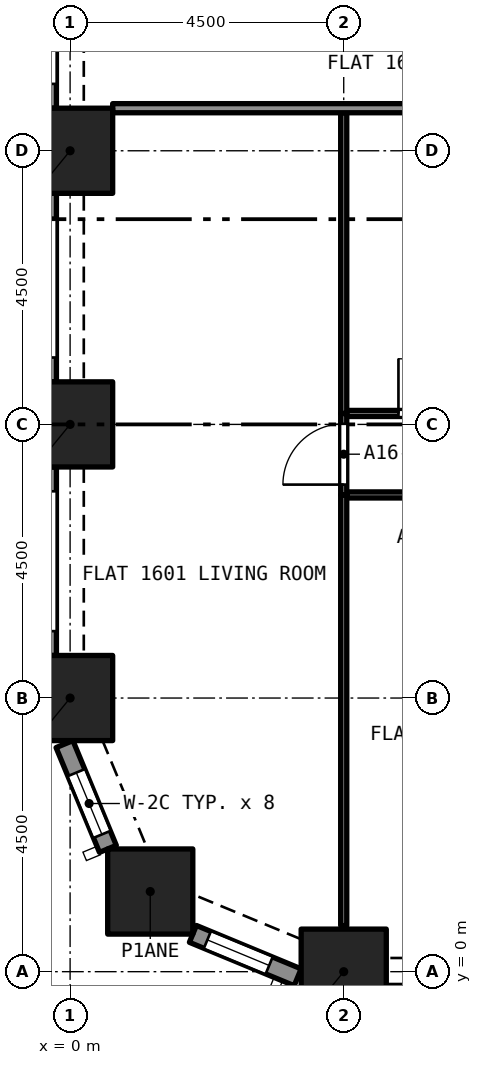
"""IFC4 building model, lengths in metres.
Left out: names, types, materials, properties, quantities, classifications, styles, units other than length and angle.
Written with IfcOpenShell. Run it as: python <this file> out.ifc"""

import sys

from ifc_helpers import new_model, si_unit, direction, frame, frame_2d, origin, origin_2d, place, context, subcontext, project, spatial, rectangle, extrude, element, fill, save


model = new_model("IFC4")
c1 = context("Model", 3, precision=1e-05, world=origin(), true_north=direction((0.0, 1.0)))
c2 = subcontext(c1, "Body", "Model", "MODEL_VIEW")
j1 = project(units=[si_unit("LENGTHUNIT", "METRE"), si_unit("PLANEANGLEUNIT", "RADIAN")], contexts=[c1])
p1 = place(None, origin())
s1 = spatial("IfcSite", under=j1, at=p1, CompositionType="ELEMENT")
p2 = place(p1, origin())
s2 = spatial("IfcBuilding", under=s1, at=p2, CompositionType="ELEMENT")
p3 = place(p2, frame((0.0, 0.0, 62.4)))
s3 = spatial("IfcBuildingStorey", under=s2, at=p3, CompositionType="ELEMENT", Elevation=62.4)
for number, where, z_axis, x_axis in (
    (1, (4.5, 0.0, 0.0), (0.0, 0.0, 1.0), (1.0, 0.0, 0.0)),
    (2, (1.318, 1.318, 0.0), (0.0, 0.0, 1.0), (1.0, 0.0, 0.0)),
    (3, (0.0, 4.5, 0.0), (0.0, 0.0, 1.0), (1.0, 0.0, 0.0)),
    (4, (0.0, 9.0, 0.0), (0.0, 0.0, 1.0), (1.0, 0.0, 0.0)),
    (5, (0.0, 13.5, 0.0), (0.0, 0.0, 1.0), (1.0, 0.0, 0.0)),
):
    element("IfcColumn", number, at=place(p3, frame(where, z_axis=z_axis, x_axis=x_axis)), inside=s3, PredefinedType="COLUMN", context=c2, shape_type="SweptSolid", body=[
        extrude(rectangle(XDim=1.4, YDim=1.4, at=origin_2d()), origin(), (0.0, 0.0, 1.0), 3.2),
    ])
p4 = place(p3, frame((0.622, 2.02, 0.0), z_axis=(0.0, 0.0, 1.0), x_axis=(-0.38262540684, 0.923903565336, 0.0)))
e6 = element("IfcWall", 6, at=p4, inside=s3, PredefinedType="SOLIDWALL", context=c2, shape_type="SweptSolid", body=[
    extrude(rectangle(XDim=1.865, YDim=0.3, at=frame_2d((0.933, 0.0))), origin(), (0.0, 0.0, 1.0), 3.2),
])
p5 = place(p4, frame((0.258, 0.0, 0.45)))
e7 = element("IfcOpeningElement", 7, at=p5, cuts=e6, PredefinedType="OPENING", context=c2, shape_type="SweptSolid", body=[
    extrude(rectangle(XDim=1.1, YDim=1.95, at=frame_2d((0.55, 0.975))), frame((0.0, 0.16, 0.0), z_axis=(0.0, -1.0, 0.0), x_axis=(1.0, 0.0, 0.0)), (0.0, 0.0, 1.0), 0.32),
])
p6 = place(p3, frame((3.743, -0.092, 0.0), z_axis=(0.0, 0.0, 1.0), x_axis=(-0.923857286003, 0.382737135771, 0.0)))
e8 = element("IfcWall", 8, at=p6, inside=s3, PredefinedType="SOLIDWALL", context=c2, shape_type="SweptSolid", body=[
    extrude(rectangle(XDim=1.865, YDim=0.3, at=frame_2d((0.933, 0.0))), origin(), (0.0, 0.0, 1.0), 3.2),
])
p7 = place(p6, frame((0.508, 0.0, 0.45)))
e9 = element("IfcOpeningElement", 9, at=p7, cuts=e8, PredefinedType="OPENING", context=c2, shape_type="SweptSolid", body=[
    extrude(rectangle(XDim=1.1, YDim=1.95, at=frame_2d((0.55, 0.975))), frame((0.0, 0.16, 0.0), z_axis=(0.0, -1.0, 0.0), x_axis=(1.0, 0.0, 0.0)), (0.0, 0.0, 1.0), 0.32),
])
p8 = place(p3, frame((-0.375, 14.2, 0.0), z_axis=(0.0, 0.0, 1.0), x_axis=(0.0, 1.0, 0.0)))
e10 = element("IfcWall", 10, at=p8, inside=s3, PredefinedType="SOLIDWALL", context=c2, shape_type="SweptSolid", body=[
    extrude(rectangle(XDim=3.1, YDim=0.3, at=frame_2d((1.55, 0.0))), origin(), (0.0, 0.0, 1.0), 3.2),
])
p9 = place(p8, frame((0.4, 0.0, 0.45)))
e11 = element("IfcOpeningElement", 11, at=p9, cuts=e10, PredefinedType="OPENING", context=c2, shape_type="SweptSolid", body=[
    extrude(rectangle(XDim=2.3, YDim=1.95, at=frame_2d((1.15, 0.975))), frame((0.0, 0.16, 0.0), z_axis=(0.0, -1.0, 0.0), x_axis=(1.0, 0.0, 0.0)), (0.0, 0.0, 1.0), 0.32),
])
p10 = place(p3, frame((-0.375, 9.7, 0.0), z_axis=(0.0, 0.0, 1.0), x_axis=(0.0, 1.0, 0.0)))
e12 = element("IfcWall", 12, at=p10, inside=s3, PredefinedType="SOLIDWALL", context=c2, shape_type="SweptSolid", body=[
    extrude(rectangle(XDim=3.1, YDim=0.3, at=frame_2d((1.55, 0.0))), origin(), (0.0, 0.0, 1.0), 3.2),
])
p11 = place(p10, frame((0.4, 0.0, 0.45)))
e13 = element("IfcOpeningElement", 13, at=p11, cuts=e12, PredefinedType="OPENING", context=c2, shape_type="SweptSolid", body=[
    extrude(rectangle(XDim=2.3, YDim=1.95, at=frame_2d((1.15, 0.975))), frame((0.0, 0.16, 0.0), z_axis=(0.0, -1.0, 0.0), x_axis=(1.0, 0.0, 0.0)), (0.0, 0.0, 1.0), 0.32),
])
p12 = place(p3, frame((-0.375, 5.2, 0.0), z_axis=(0.0, 0.0, 1.0), x_axis=(0.0, 1.0, 0.0)))
e14 = element("IfcWall", 14, at=p12, inside=s3, PredefinedType="SOLIDWALL", context=c2, shape_type="SweptSolid", body=[
    extrude(rectangle(XDim=3.1, YDim=0.3, at=frame_2d((1.55, 0.0))), origin(), (0.0, 0.0, 1.0), 3.2),
])
p13 = place(p12, frame((0.4, 0.0, 0.45)))
e15 = element("IfcOpeningElement", 15, at=p13, cuts=e14, PredefinedType="OPENING", context=c2, shape_type="SweptSolid", body=[
    extrude(rectangle(XDim=2.3, YDim=1.95, at=frame_2d((1.15, 0.975))), frame((0.0, 0.16, 0.0), z_axis=(0.0, -1.0, 0.0), x_axis=(1.0, 0.0, 0.0)), (0.0, 0.0, 1.0), 0.32),
])
p14 = place(p3, frame((9.0, 7.84, 0.0), z_axis=(0.0, 0.0, 1.0), x_axis=(-1.0, 0.0, 0.0)))
e16 = element("IfcWall", 16, at=p14, inside=s3, PredefinedType="PARTITIONING", context=c2, shape_type="SweptSolid", body=[
    extrude(rectangle(XDim=4.45, YDim=0.1, at=frame_2d((2.225, 0.0))), origin(), (0.0, 0.0, 1.0), 2.9),
])
p15 = place(p14, frame((1.8, 0.0, 0.0)))
e17 = element("IfcOpeningElement", 17, at=p15, cuts=e16, PredefinedType="OPENING", context=c2, shape_type="SweptSolid", body=[
    extrude(rectangle(XDim=0.9, YDim=2.1, at=frame_2d((0.45, 1.05))), frame((0.0, 0.06, 0.0), z_axis=(0.0, -1.0, 0.0), x_axis=(1.0, 0.0, 0.0)), (0.0, 0.0, 1.0), 0.12),
])
p16 = place(p3, frame((4.5, 0.758, 0.0), z_axis=(0.0, 0.0, 1.0), x_axis=(0.0, 1.0, 0.0)))
e18 = element("IfcWall", 18, at=p16, inside=s3, PredefinedType="PARTITIONING", context=c2, shape_type="SweptSolid", body=[
    extrude(rectangle(XDim=7.083, YDim=0.1, at=frame_2d((3.541, 0.0))), origin(), (0.0, 0.0, 1.0), 2.9),
])
p17 = place(p3, frame((4.55, 9.18, 0.0), z_axis=(0.0, 0.0, 1.0), x_axis=(1.0, 0.0, 0.0)))
e19 = element("IfcWall", 19, at=p17, inside=s3, PredefinedType="PARTITIONING", context=c2, shape_type="SweptSolid", body=[
    extrude(rectangle(XDim=2.7, YDim=0.1, at=frame_2d((1.35, 0.0))), origin(), (0.0, 0.0, 1.0), 2.9),
])
p18 = place(p17, frame((0.85, 0.0, 0.0)))
e20 = element("IfcOpeningElement", 20, at=p18, cuts=e19, PredefinedType="OPENING", context=c2, shape_type="SweptSolid", body=[
    extrude(rectangle(XDim=0.9, YDim=2.1, at=frame_2d((0.45, 1.05))), frame((0.0, 0.06, 0.0), z_axis=(0.0, -1.0, 0.0), x_axis=(1.0, 0.0, 0.0)), (0.0, 0.0, 1.0), 0.12),
])
p19 = place(p3, frame((4.5, 7.84, 0.0), z_axis=(0.0, 0.0, 1.0), x_axis=(0.0, 1.0, 0.0)))
e21 = element("IfcWall", 21, at=p19, inside=s3, PredefinedType="PARTITIONING", context=c2, shape_type="SweptSolid", body=[
    extrude(rectangle(XDim=1.34, YDim=0.1, at=frame_2d((0.67, 0.0))), origin(), (0.0, 0.0, 1.0), 2.9),
])
p20 = place(p19, frame((0.17, 0.0, 0.0)))
e22 = element("IfcOpeningElement", 22, at=p20, cuts=e21, PredefinedType="OPENING", context=c2, shape_type="SweptSolid", body=[
    extrude(rectangle(XDim=1.0, YDim=2.1, at=frame_2d((0.5, 1.05))), frame((0.0, 0.06, 0.0), z_axis=(0.0, -1.0, 0.0), x_axis=(1.0, 0.0, 0.0)), (0.0, 0.0, 1.0), 0.12),
])
p21 = place(p3, frame((4.5, 9.18, 0.0), z_axis=(0.0, 0.0, 1.0), x_axis=(0.0, 1.0, 0.0)))
e23 = element("IfcWall", 23, at=p21, inside=s3, PredefinedType="PARTITIONING", context=c2, shape_type="SweptSolid", body=[
    extrude(rectangle(XDim=4.945, YDim=0.1, at=frame_2d((2.473, 0.0))), origin(), (0.0, 0.0, 1.0), 2.9),
])
p22 = place(p3, frame((0.7, 14.2, 0.0), z_axis=(0.0, 0.0, 1.0), x_axis=(1.0, 0.0, 0.0)))
e24 = element("IfcWall", 24, at=p22, inside=s3, PredefinedType="PARTITIONING", context=c2, shape_type="SweptSolid", body=[
    extrude(rectangle(XDim=6.5, YDim=0.15, at=frame_2d((3.25, 0.0))), origin(), (0.0, 0.0, 1.0), 2.9),
])
p23 = place(p5, origin())
e25 = element("IfcWindow", 25, at=p23, inside=s3, PartitioningType="SINGLE_PANEL", PredefinedType="WINDOW", context=c2, shape_type="SweptSolid", body=[
    extrude(rectangle(XDim=1.1, YDim=1.95, at=frame_2d((0.55, 0.975))), frame((0.0, 0.03, 0.0), z_axis=(0.0, -1.0, 0.0), x_axis=(1.0, 0.0, 0.0)), (0.0, 0.0, 1.0), 0.06),
])
fill(e7, e25)
p24 = place(p7, origin())
e26 = element("IfcWindow", 26, at=p24, inside=s3, PartitioningType="SINGLE_PANEL", PredefinedType="WINDOW", context=c2, shape_type="SweptSolid", body=[
    extrude(rectangle(XDim=1.1, YDim=1.95, at=frame_2d((0.55, 0.975))), frame((0.0, 0.03, 0.0), z_axis=(0.0, -1.0, 0.0), x_axis=(1.0, 0.0, 0.0)), (0.0, 0.0, 1.0), 0.06),
])
fill(e9, e26)
p25 = place(p18, origin())
e27 = element("IfcDoor", 27, at=p25, inside=s3, OperationType="SINGLE_SWING_LEFT", PredefinedType="DOOR", context=c2, shape_type="SweptSolid", body=[
    extrude(rectangle(XDim=0.9, YDim=2.1, at=frame_2d((0.45, 1.05))), frame((0.0, 0.025, 0.0), z_axis=(0.0, -1.0, 0.0), x_axis=(1.0, 0.0, 0.0)), (0.0, 0.0, 1.0), 0.05),
])
fill(e20, e27)
p26 = place(p20, origin())
e28 = element("IfcDoor", 28, at=p26, inside=s3, OperationType="SINGLE_SWING_RIGHT", PredefinedType="DOOR", context=c2, shape_type="SweptSolid", body=[
    extrude(rectangle(XDim=1.0, YDim=2.1, at=frame_2d((0.5, 1.05))), frame((0.0, 0.025, 0.0), z_axis=(0.0, -1.0, 0.0), x_axis=(1.0, 0.0, 0.0)), (0.0, 0.0, 1.0), 0.05),
])
fill(e22, e28)
save(model, sys.argv[1])
